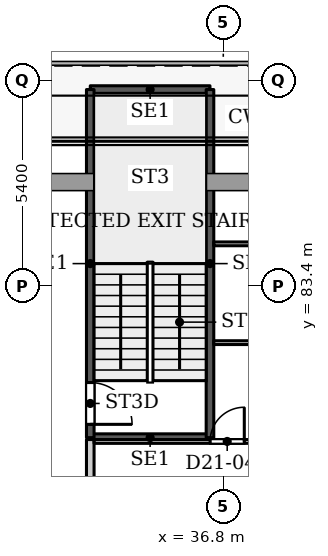
"""IFC4 building model, lengths in metres.
Left out: names, types, materials, properties, quantities, classifications, styles, units other than length and angle.
Written with IfcOpenShell. Run it as: python <this file> out.ifc"""

import sys

from ifc_helpers import new_model, si_unit, direction, frame, frame_2d, origin, place, context, subcontext, project, spatial, rectangle, extrude, source, transform, mapped, element, fill, save


model = new_model("IFC4")
c1 = context("Model", 3, precision=1e-05, world=origin(), true_north=direction((0.0, 1.0)))
c2 = subcontext(c1, "Body", "Model", "MODEL_VIEW")
j1 = project(units=[si_unit("LENGTHUNIT", "METRE"), si_unit("PLANEANGLEUNIT", "RADIAN")], contexts=[c1])
p1 = place(None, origin())
s1 = spatial("IfcSite", under=j1, at=p1, CompositionType="ELEMENT")
p2 = place(p1, origin())
s2 = spatial("IfcBuilding", under=s1, at=p2, CompositionType="ELEMENT")
p3 = place(p2, frame((0.0, 0.0, 98.0)))
s3 = spatial("IfcBuildingStorey", under=s2, at=p3, CompositionType="ELEMENT", Elevation=98.0)
for number, where, z_axis, x_axis in (
    (1, (33.3, 79.4, 0.0), (0.0, 0.0, 1.0), (1.0, 0.0, 0.0)),
    (2, (33.3, 88.56, 0.0), (0.0, 0.0, 1.0), (1.0, 0.0, 0.0)),
):
    element("IfcWall", number, at=place(p3, frame(where, z_axis=z_axis, x_axis=x_axis)), inside=s3, PredefinedType="SHEAR", context=c2, shape_type="SweptSolid", body=[
        extrude(rectangle(XDim=3.15, YDim=0.2, at=frame_2d((1.575, 0.0))), origin(), (0.0, 0.0, 1.0), 3.9),
    ])
p4 = place(p3, frame((33.3, 79.4, 0.0), z_axis=(0.0, 0.0, 1.0), x_axis=(0.0, 1.0, 0.0)))
e3 = element("IfcWall", 3, at=p4, inside=s3, PredefinedType="SHEAR", context=c2, shape_type="SweptSolid", body=[
    extrude(rectangle(XDim=9.16, YDim=0.2, at=frame_2d((4.58, 0.0))), origin(), (0.0, 0.0, 1.0), 3.9),
])
p5 = place(p4, frame((0.35, 0.0, 0.0)))
e4 = element("IfcOpeningElement", 4, at=p5, cuts=e3, PredefinedType="OPENING", context=c2, shape_type="SweptSolid", body=[
    extrude(rectangle(XDim=1.1, YDim=2.2, at=frame_2d((0.55, 1.1))), frame((0.0, 0.11, 0.0), z_axis=(0.0, -1.0, 0.0), x_axis=(1.0, 0.0, 0.0)), (0.0, 0.0, 1.0), 0.22),
])
p6 = place(p3, frame((36.45, 79.4, 0.0), z_axis=(0.0, 0.0, 1.0), x_axis=(0.0, 1.0, 0.0)))
e5 = element("IfcWall", 5, at=p6, inside=s3, PredefinedType="SHEAR", context=c2, shape_type="SweptSolid", body=[
    extrude(rectangle(XDim=9.16, YDim=0.2, at=frame_2d((4.58, 0.0))), origin(), (0.0, 0.0, 1.0), 3.9),
])
p7 = place(p3, frame((33.3, 54.4, 0.0), z_axis=(0.0, 0.0, 1.0), x_axis=(0.0, 1.0, 0.0)))
e6 = element("IfcWall", 6, at=p7, inside=s3, PredefinedType="PARTITIONING", context=c2, shape_type="SweptSolid", body=[
    extrude(rectangle(XDim=24.95, YDim=0.2, at=frame_2d((12.475, 0.0))), origin(), (0.0, 0.0, 1.0), 3.6),
])
p8 = place(p7, frame((5.5, 0.0, 0.0)))
e7 = element("IfcOpeningElement", 7, at=p8, cuts=e6, PredefinedType="OPENING", context=c2, shape_type="SweptSolid", body=[
    extrude(rectangle(XDim=1.0, YDim=2.1, at=frame_2d((0.5, 1.05))), frame((0.0, 0.11, 0.0), z_axis=(0.0, -1.0, 0.0), x_axis=(1.0, 0.0, 0.0)), (0.0, 0.0, 1.0), 0.22),
])
p9 = place(p7, frame((22.3, 0.0, 0.0)))
e8 = element("IfcOpeningElement", 8, at=p9, cuts=e6, PredefinedType="OPENING", context=c2, shape_type="SweptSolid", body=[
    extrude(rectangle(XDim=1.0, YDim=2.1, at=frame_2d((0.5, 1.05))), frame((0.0, 0.11, 0.0), z_axis=(0.0, -1.0, 0.0), x_axis=(1.0, 0.0, 0.0)), (0.0, 0.0, 1.0), 0.22),
])
p10 = place(p3, frame((33.4, 79.3, 0.0), z_axis=(0.0, 0.0, 1.0), x_axis=(1.0, 0.0, 0.0)))
e9 = element("IfcWall", 9, at=p10, inside=s3, PredefinedType="PARTITIONING", context=c2, shape_type="SweptSolid", body=[
    extrude(rectangle(XDim=12.5, YDim=0.1, at=frame_2d((6.25, 0.0))), origin(), (0.0, 0.0, 1.0), 3.6),
])
p11 = place(p10, frame((3.053, 0.0, 0.0)))
e10 = element("IfcOpeningElement", 10, at=p11, cuts=e9, PredefinedType="OPENING", context=c2, shape_type="SweptSolid", body=[
    extrude(rectangle(XDim=0.9, YDim=2.1, at=frame_2d((0.45, 1.05))), frame((0.0, 0.06, 0.0), z_axis=(0.0, -1.0, 0.0), x_axis=(1.0, 0.0, 0.0)), (0.0, 0.0, 1.0), 0.12),
])
p12 = place(p3, frame((36.549, 81.9, 0.0), z_axis=(0.0, 0.0, 1.0), x_axis=(1.0, 0.0, 0.0)))
e11 = element("IfcWall", 11, at=p12, inside=s3, PredefinedType="PARTITIONING", context=c2, shape_type="SweptSolid", body=[
    extrude(rectangle(XDim=9.351, YDim=0.1, at=frame_2d((4.675, 0.0))), origin(), (0.0, 0.0, 1.0), 3.6),
])
p13 = place(p12, frame((4.176, 0.0, 0.0)))
e12 = element("IfcOpeningElement", 12, at=p13, cuts=e11, PredefinedType="OPENING", context=c2, shape_type="SweptSolid", body=[
    extrude(rectangle(XDim=0.9, YDim=2.1, at=frame_2d((0.45, 1.05))), frame((0.0, 0.06, 0.0), z_axis=(0.0, -1.0, 0.0), x_axis=(1.0, 0.0, 0.0)), (0.0, 0.0, 1.0), 0.12),
])
p14 = place(p3, frame((36.549, 84.5, 0.0), z_axis=(0.0, 0.0, 1.0), x_axis=(1.0, 0.0, 0.0)))
e13 = element("IfcWall", 13, at=p14, inside=s3, PredefinedType="PARTITIONING", context=c2, shape_type="SweptSolid", body=[
    extrude(rectangle(XDim=9.351, YDim=0.1, at=frame_2d((4.675, 0.0))), origin(), (0.0, 0.0, 1.0), 3.6),
])
p15 = place(p14, frame((4.176, 0.0, 0.0)))
e14 = element("IfcOpeningElement", 14, at=p15, cuts=e13, PredefinedType="OPENING", context=c2, shape_type="SweptSolid", body=[
    extrude(rectangle(XDim=0.9, YDim=2.1, at=frame_2d((0.45, 1.05))), frame((0.0, 0.06, 0.0), z_axis=(0.0, -1.0, 0.0), x_axis=(1.0, 0.0, 0.0)), (0.0, 0.0, 1.0), 0.12),
])
m1 = source(origin(), c2, "Body", "SweptSolid", [
    extrude(rectangle(XDim=1.1, YDim=2.2, at=frame_2d((0.55, 1.1))), frame((0.0, 0.025, 0.0), z_axis=(0.0, -1.0, 0.0), x_axis=(1.0, 0.0, 0.0)), (0.0, 0.0, 1.0), 0.05),
])
p16 = place(p5, origin())
e15 = element("IfcDoor", 15, at=p16, inside=s3, OperationType="SINGLE_SWING_RIGHT", PredefinedType="DOOR", context=c2, shape_type="MappedRepresentation", body=[
    mapped(m1, transform((0.0, 0.0, 0.0), x_axis=(1.0, 0.0, 0.0), y_axis=(0.0, 1.0, 0.0), z_axis=(0.0, 0.0, 1.0), scale=1.0)),
])
fill(e4, e15)
m2 = source(origin(), c2, "Body", "SweptSolid", [
    extrude(rectangle(XDim=0.9, YDim=2.1, at=frame_2d((0.45, 1.05))), frame((0.0, 0.025, 0.0), z_axis=(0.0, -1.0, 0.0), x_axis=(1.0, 0.0, 0.0)), (0.0, 0.0, 1.0), 0.05),
])
p17 = place(p11, origin())
e16 = element("IfcDoor", 16, at=p17, inside=s3, OperationType="SINGLE_SWING_LEFT", PredefinedType="DOOR", context=c2, shape_type="MappedRepresentation", body=[
    mapped(m2, transform((0.0, 0.0, 0.0), x_axis=(1.0, 0.0, 0.0), y_axis=(0.0, 1.0, 0.0), z_axis=(0.0, 0.0, 1.0), scale=1.0)),
])
fill(e10, e16)
save(model, sys.argv[1])
